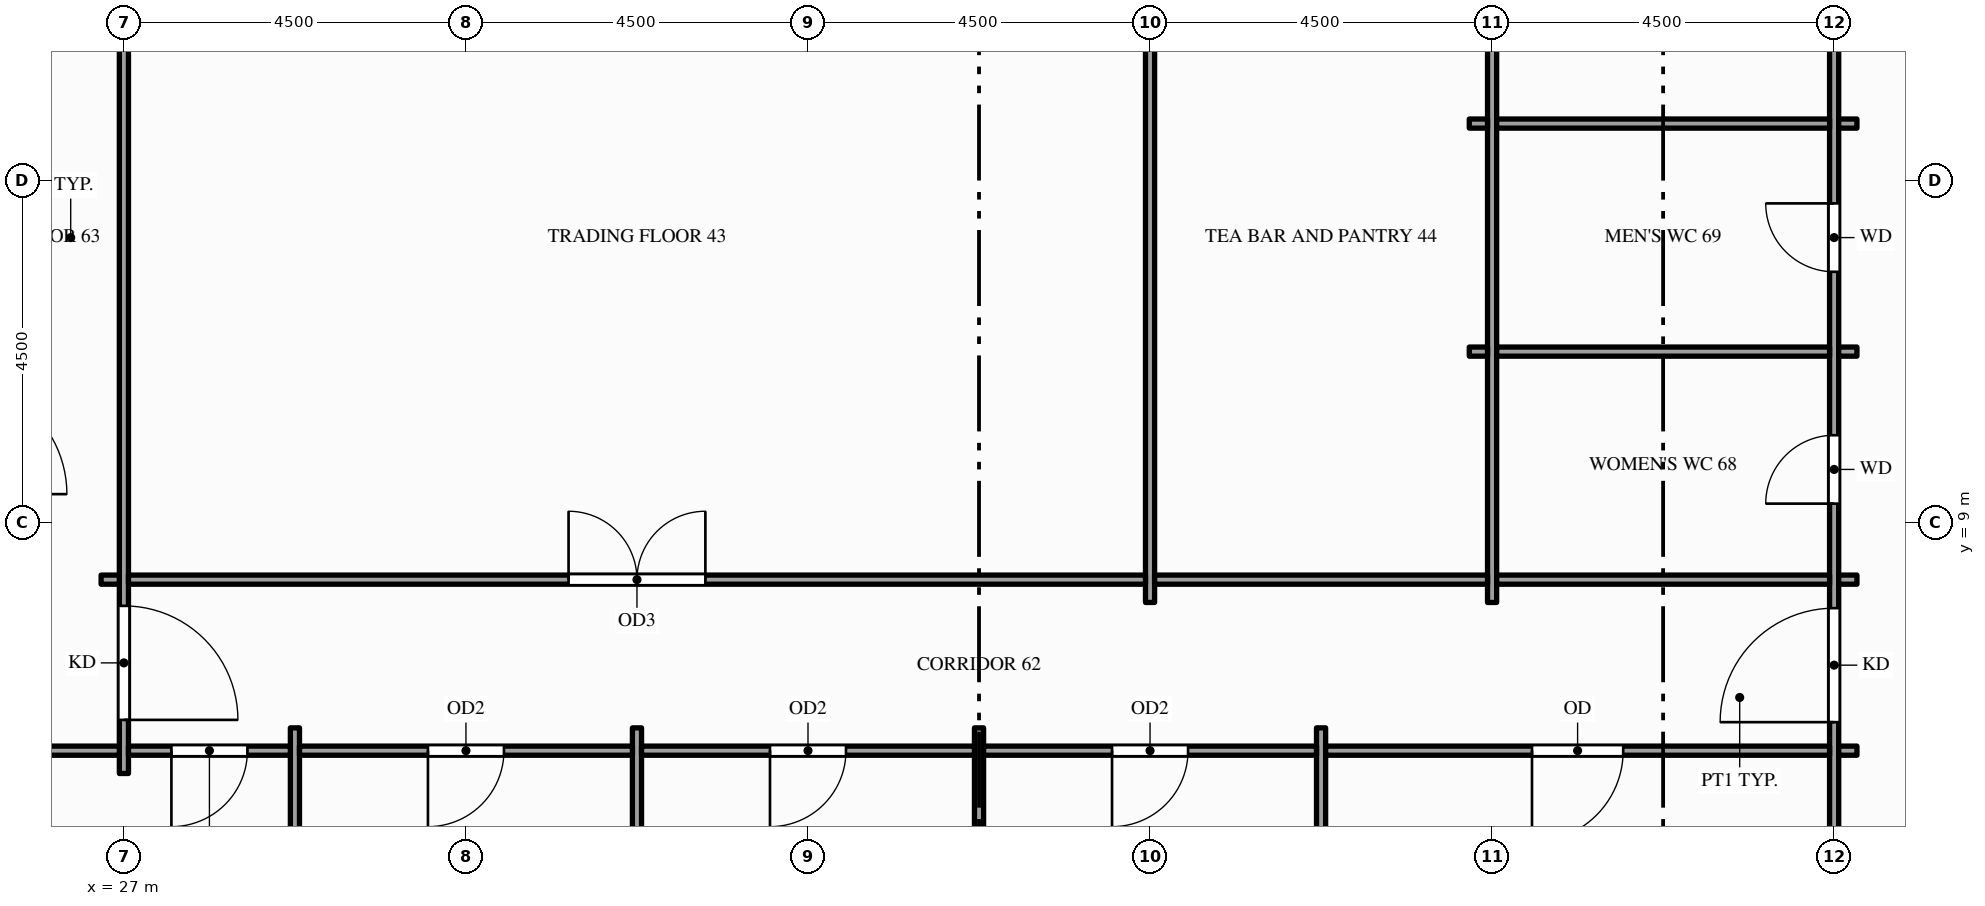
"""IFC4 building model, lengths in metres.
Left out: names, types, materials, properties, quantities, classifications, styles, units other than length and angle.
Written with IfcOpenShell. Run it as: python <this file> out.ifc"""

import sys

from ifc_helpers import new_model, si_unit, direction, frame, frame_2d, origin, place, context, subcontext, project, spatial, rectangle, extrude, element, fill, save


model = new_model("IFC4")
c1 = context("Model", 3, precision=1e-05, world=origin(), true_north=direction((0.0, 1.0)))
c2 = subcontext(c1, "Body", "Model", "MODEL_VIEW")
j1 = project(units=[si_unit("LENGTHUNIT", "METRE"), si_unit("PLANEANGLEUNIT", "RADIAN")], contexts=[c1])
p1 = place(None, origin())
s1 = spatial("IfcSite", under=j1, at=p1, CompositionType="ELEMENT")
p2 = place(p1, origin())
s2 = spatial("IfcBuilding", under=s1, at=p2, CompositionType="ELEMENT")
p3 = place(p2, frame((0.0, 0.0, 159.0)))
s3 = spatial("IfcBuildingStorey", under=s2, at=p3, CompositionType="ELEMENT", Elevation=159.0)
p4 = place(p3, frame((27.0, 5.7, 0.0), z_axis=(0.0, 0.0, 1.0), x_axis=(0.0, 1.0, 0.0)))
e1 = element("IfcWall", 1, at=p4, inside=s3, PredefinedType="PARTITIONING", context=c2, shape_type="SweptSolid", body=[
    extrude(rectangle(XDim=14.1, YDim=0.12, at=frame_2d((7.05, 0.0))), origin(), (0.0, 0.0, 1.0), 2.87),
])
p5 = place(p4, frame((0.705, 0.0, 0.0)))
e2 = element("IfcOpeningElement", 2, at=p5, cuts=e1, PredefinedType="OPENING", context=c2, shape_type="SweptSolid", body=[
    extrude(rectangle(XDim=1.5, YDim=2.1, at=frame_2d((0.75, 1.05))), frame((0.0, 0.07, 0.0), z_axis=(0.0, -1.0, 0.0), x_axis=(1.0, 0.0, 0.0)), (0.0, 0.0, 1.0), 0.14),
])
p6 = place(p4, frame((11.895, 0.0, 0.0)))
e3 = element("IfcOpeningElement", 3, at=p6, cuts=e1, PredefinedType="OPENING", context=c2, shape_type="SweptSolid", body=[
    extrude(rectangle(XDim=1.5, YDim=2.1, at=frame_2d((0.75, 1.05))), frame((0.0, 0.07, 0.0), z_axis=(0.0, -1.0, 0.0), x_axis=(1.0, 0.0, 0.0)), (0.0, 0.0, 1.0), 0.14),
])
for number, where, z_axis, x_axis in (
    (4, (29.25, 1.65, 0.0), (0.0, 0.0, 1.0), (0.0, 1.0, 0.0)),
    (5, (33.75, 1.65, 0.0), (0.0, 0.0, 1.0), (0.0, 1.0, 0.0)),
    (6, (38.25, 1.65, 0.0), (0.0, 0.0, 1.0), (0.0, 1.0, 0.0)),
):
    element("IfcWall", number, at=place(p3, frame(where, z_axis=z_axis, x_axis=x_axis)), inside=s3, PredefinedType="PARTITIONING", context=c2, shape_type="SweptSolid", body=[
        extrude(rectangle(XDim=4.65, YDim=0.12, at=frame_2d((2.325, 0.0))), origin(), (0.0, 0.0, 1.0), 2.87),
    ])
p7 = place(p3, frame((40.5, 7.95, 0.0), z_axis=(0.0, 0.0, 1.0), x_axis=(0.0, 1.0, 0.0)))
e7 = element("IfcWall", 7, at=p7, inside=s3, PredefinedType="PARTITIONING", context=c2, shape_type="SweptSolid", body=[
    extrude(rectangle(XDim=9.6, YDim=0.12, at=frame_2d((4.8, 0.0))), origin(), (0.0, 0.0, 1.0), 2.87),
])
p8 = place(p3, frame((42.75, 1.65, 0.0), z_axis=(0.0, 0.0, 1.0), x_axis=(0.0, 1.0, 0.0)))
e8 = element("IfcWall", 8, at=p8, inside=s3, PredefinedType="PARTITIONING", context=c2, shape_type="SweptSolid", body=[
    extrude(rectangle(XDim=4.65, YDim=0.12, at=frame_2d((2.325, 0.0))), origin(), (0.0, 0.0, 1.0), 2.87),
])
p9 = place(p3, frame((45.0, 7.95, 0.0), z_axis=(0.0, 0.0, 1.0), x_axis=(0.0, 1.0, 0.0)))
e9 = element("IfcWall", 9, at=p9, inside=s3, PredefinedType="PARTITIONING", context=c2, shape_type="SweptSolid", body=[
    extrude(rectangle(XDim=9.6, YDim=0.12, at=frame_2d((4.8, 0.0))), origin(), (0.0, 0.0, 1.0), 2.87),
])
p10 = place(p3, frame((49.5, 1.65, 0.0), z_axis=(0.0, 0.0, 1.0), x_axis=(0.0, 1.0, 0.0)))
e10 = element("IfcWall", 10, at=p10, inside=s3, PredefinedType="PARTITIONING", context=c2, shape_type="SweptSolid", body=[
    extrude(rectangle(XDim=22.2, YDim=0.12, at=frame_2d((11.1, 0.0))), origin(), (0.0, 0.0, 1.0), 2.87),
])
p11 = place(p10, frame((4.725, 0.0, 0.0)))
e11 = element("IfcOpeningElement", 11, at=p11, cuts=e10, PredefinedType="OPENING", context=c2, shape_type="SweptSolid", body=[
    extrude(rectangle(XDim=1.5, YDim=2.1, at=frame_2d((0.75, 1.05))), frame((0.0, 0.07, 0.0), z_axis=(0.0, -1.0, 0.0), x_axis=(1.0, 0.0, 0.0)), (0.0, 0.0, 1.0), 0.14),
])
p12 = place(p10, frame((15.975, 0.0, 0.0)))
e12 = element("IfcOpeningElement", 12, at=p12, cuts=e10, PredefinedType="OPENING", context=c2, shape_type="SweptSolid", body=[
    extrude(rectangle(XDim=1.5, YDim=2.1, at=frame_2d((0.75, 1.05))), frame((0.0, 0.07, 0.0), z_axis=(0.0, -1.0, 0.0), x_axis=(1.0, 0.0, 0.0)), (0.0, 0.0, 1.0), 0.14),
])
p13 = place(p10, frame((7.6, 0.0, 0.0)))
e13 = element("IfcOpeningElement", 13, at=p13, cuts=e10, PredefinedType="OPENING", context=c2, shape_type="SweptSolid", body=[
    extrude(rectangle(XDim=0.9, YDim=2.1, at=frame_2d((0.45, 1.05))), frame((0.0, 0.07, 0.0), z_axis=(0.0, -1.0, 0.0), x_axis=(1.0, 0.0, 0.0)), (0.0, 0.0, 1.0), 0.14),
])
p14 = place(p10, frame((10.65, 0.0, 0.0)))
e14 = element("IfcOpeningElement", 14, at=p14, cuts=e10, PredefinedType="OPENING", context=c2, shape_type="SweptSolid", body=[
    extrude(rectangle(XDim=0.9, YDim=2.1, at=frame_2d((0.45, 1.05))), frame((0.0, 0.07, 0.0), z_axis=(0.0, -1.0, 0.0), x_axis=(1.0, 0.0, 0.0)), (0.0, 0.0, 1.0), 0.14),
])
p15 = place(p10, frame((13.6, 0.0, 0.0)))
e15 = element("IfcOpeningElement", 15, at=p15, cuts=e10, PredefinedType="OPENING", context=c2, shape_type="SweptSolid", body=[
    extrude(rectangle(XDim=1.0, YDim=2.1, at=frame_2d((0.5, 1.05))), frame((0.0, 0.07, 0.0), z_axis=(0.0, -1.0, 0.0), x_axis=(1.0, 0.0, 0.0)), (0.0, 0.0, 1.0), 0.14),
])
p16 = place(p3, frame((24.81, 6.0, 0.0), z_axis=(0.0, 0.0, 1.0), x_axis=(1.0, 0.0, 0.0)))
e16 = element("IfcWall", 16, at=p16, inside=s3, PredefinedType="PARTITIONING", context=c2, shape_type="SweptSolid", body=[
    extrude(rectangle(XDim=2.13, YDim=0.12, at=frame_2d((1.065, 0.0))), origin(), (0.0, 0.0, 1.0), 2.87),
])
p17 = place(p3, frame((27.06, 6.0, 0.0), z_axis=(0.0, 0.0, 1.0), x_axis=(1.0, 0.0, 0.0)))
e17 = element("IfcWall", 17, at=p17, inside=s3, PredefinedType="PARTITIONING", context=c2, shape_type="SweptSolid", body=[
    extrude(rectangle(XDim=2.13, YDim=0.12, at=frame_2d((1.065, 0.0))), origin(), (0.0, 0.0, 1.0), 2.87),
])
p18 = place(p17, frame((0.565, 0.0, 0.0)))
e18 = element("IfcOpeningElement", 18, at=p18, cuts=e17, PredefinedType="OPENING", context=c2, shape_type="SweptSolid", body=[
    extrude(rectangle(XDim=1.0, YDim=2.1, at=frame_2d((0.5, 1.05))), frame((0.0, 0.07, 0.0), z_axis=(0.0, -1.0, 0.0), x_axis=(1.0, 0.0, 0.0)), (0.0, 0.0, 1.0), 0.14),
])
p19 = place(p3, frame((29.31, 6.0, 0.0), z_axis=(0.0, 0.0, 1.0), x_axis=(1.0, 0.0, 0.0)))
e19 = element("IfcWall", 19, at=p19, inside=s3, PredefinedType="PARTITIONING", context=c2, shape_type="SweptSolid", body=[
    extrude(rectangle(XDim=4.38, YDim=0.12, at=frame_2d((2.19, 0.0))), origin(), (0.0, 0.0, 1.0), 2.87),
])
p20 = place(p19, frame((1.69, 0.0, 0.0)))
e20 = element("IfcOpeningElement", 20, at=p20, cuts=e19, PredefinedType="OPENING", context=c2, shape_type="SweptSolid", body=[
    extrude(rectangle(XDim=1.0, YDim=2.1, at=frame_2d((0.5, 1.05))), frame((0.0, 0.07, 0.0), z_axis=(0.0, -1.0, 0.0), x_axis=(1.0, 0.0, 0.0)), (0.0, 0.0, 1.0), 0.14),
])
p21 = place(p3, frame((33.81, 6.0, 0.0), z_axis=(0.0, 0.0, 1.0), x_axis=(1.0, 0.0, 0.0)))
e21 = element("IfcWall", 21, at=p21, inside=s3, PredefinedType="PARTITIONING", context=c2, shape_type="SweptSolid", body=[
    extrude(rectangle(XDim=4.38, YDim=0.12, at=frame_2d((2.19, 0.0))), origin(), (0.0, 0.0, 1.0), 2.87),
])
p22 = place(p21, frame((1.69, 0.0, 0.0)))
e22 = element("IfcOpeningElement", 22, at=p22, cuts=e21, PredefinedType="OPENING", context=c2, shape_type="SweptSolid", body=[
    extrude(rectangle(XDim=1.0, YDim=2.1, at=frame_2d((0.5, 1.05))), frame((0.0, 0.07, 0.0), z_axis=(0.0, -1.0, 0.0), x_axis=(1.0, 0.0, 0.0)), (0.0, 0.0, 1.0), 0.14),
])
p23 = place(p3, frame((38.31, 6.0, 0.0), z_axis=(0.0, 0.0, 1.0), x_axis=(1.0, 0.0, 0.0)))
e23 = element("IfcWall", 23, at=p23, inside=s3, PredefinedType="PARTITIONING", context=c2, shape_type="SweptSolid", body=[
    extrude(rectangle(XDim=4.38, YDim=0.12, at=frame_2d((2.19, 0.0))), origin(), (0.0, 0.0, 1.0), 2.87),
])
p24 = place(p23, frame((1.69, 0.0, 0.0)))
e24 = element("IfcOpeningElement", 24, at=p24, cuts=e23, PredefinedType="OPENING", context=c2, shape_type="SweptSolid", body=[
    extrude(rectangle(XDim=1.0, YDim=2.1, at=frame_2d((0.5, 1.05))), frame((0.0, 0.07, 0.0), z_axis=(0.0, -1.0, 0.0), x_axis=(1.0, 0.0, 0.0)), (0.0, 0.0, 1.0), 0.14),
])
p25 = place(p3, frame((42.81, 6.0, 0.0), z_axis=(0.0, 0.0, 1.0), x_axis=(1.0, 0.0, 0.0)))
e25 = element("IfcWall", 25, at=p25, inside=s3, PredefinedType="PARTITIONING", context=c2, shape_type="SweptSolid", body=[
    extrude(rectangle(XDim=6.63, YDim=0.12, at=frame_2d((3.315, 0.0))), origin(), (0.0, 0.0, 1.0), 2.87),
])
p26 = place(p25, frame((2.715, 0.0, 0.0)))
e26 = element("IfcOpeningElement", 26, at=p26, cuts=e25, PredefinedType="OPENING", context=c2, shape_type="SweptSolid", body=[
    extrude(rectangle(XDim=1.2, YDim=2.1, at=frame_2d((0.6, 1.05))), frame((0.0, 0.07, 0.0), z_axis=(0.0, -1.0, 0.0), x_axis=(1.0, 0.0, 0.0)), (0.0, 0.0, 1.0), 0.14),
])
for number, where, z_axis, x_axis in (
    (27, (49.56, 6.0, 0.0), (0.0, 0.0, 1.0), (1.0, 0.0, 0.0)),
    (28, (26.7, 8.25, 0.0), (0.0, 0.0, 1.0), (1.0, 0.0, 0.0)),
):
    element("IfcWall", number, at=place(p3, frame(where, z_axis=z_axis, x_axis=x_axis)), inside=s3, PredefinedType="PARTITIONING", context=c2, shape_type="SweptSolid", body=[
        extrude(rectangle(XDim=0.24, YDim=0.12, at=frame_2d((0.12, 0.0))), origin(), (0.0, 0.0, 1.0), 2.87),
    ])
p27 = place(p3, frame((27.06, 8.25, 0.0), z_axis=(0.0, 0.0, 1.0), x_axis=(1.0, 0.0, 0.0)))
e29 = element("IfcWall", 29, at=p27, inside=s3, PredefinedType="PARTITIONING", context=c2, shape_type="SweptSolid", body=[
    extrude(rectangle(XDim=13.38, YDim=0.12, at=frame_2d((6.69, 0.0))), origin(), (0.0, 0.0, 1.0), 2.87),
])
p28 = place(p27, frame((5.79, 0.0, 0.0)))
e30 = element("IfcOpeningElement", 30, at=p28, cuts=e29, PredefinedType="OPENING", context=c2, shape_type="SweptSolid", body=[
    extrude(rectangle(XDim=1.8, YDim=2.1, at=frame_2d((0.9, 1.05))), frame((0.0, 0.07, 0.0), z_axis=(0.0, -1.0, 0.0), x_axis=(1.0, 0.0, 0.0)), (0.0, 0.0, 1.0), 0.14),
])
for number, where, z_axis, x_axis in (
    (31, (40.56, 8.25, 0.0), (0.0, 0.0, 1.0), (1.0, 0.0, 0.0)),
    (32, (45.06, 8.25, 0.0), (0.0, 0.0, 1.0), (1.0, 0.0, 0.0)),
):
    element("IfcWall", number, at=place(p3, frame(where, z_axis=z_axis, x_axis=x_axis)), inside=s3, PredefinedType="PARTITIONING", context=c2, shape_type="SweptSolid", body=[
        extrude(rectangle(XDim=4.38, YDim=0.12, at=frame_2d((2.19, 0.0))), origin(), (0.0, 0.0, 1.0), 2.87),
    ])
for number, where, z_axis, x_axis in (
    (33, (49.56, 8.25, 0.0), (0.0, 0.0, 1.0), (1.0, 0.0, 0.0)),
    (34, (44.7, 11.25, 0.0), (0.0, 0.0, 1.0), (1.0, 0.0, 0.0)),
):
    element("IfcWall", number, at=place(p3, frame(where, z_axis=z_axis, x_axis=x_axis)), inside=s3, PredefinedType="PARTITIONING", context=c2, shape_type="SweptSolid", body=[
        extrude(rectangle(XDim=0.24, YDim=0.12, at=frame_2d((0.12, 0.0))), origin(), (0.0, 0.0, 1.0), 2.87),
    ])
p29 = place(p3, frame((45.06, 11.25, 0.0), z_axis=(0.0, 0.0, 1.0), x_axis=(1.0, 0.0, 0.0)))
e35 = element("IfcWall", 35, at=p29, inside=s3, PredefinedType="PARTITIONING", context=c2, shape_type="SweptSolid", body=[
    extrude(rectangle(XDim=4.38, YDim=0.12, at=frame_2d((2.19, 0.0))), origin(), (0.0, 0.0, 1.0), 2.87),
])
for number, where, z_axis, x_axis in (
    (36, (49.56, 11.25, 0.0), (0.0, 0.0, 1.0), (1.0, 0.0, 0.0)),
    (37, (44.7, 14.25, 0.0), (0.0, 0.0, 1.0), (1.0, 0.0, 0.0)),
):
    element("IfcWall", number, at=place(p3, frame(where, z_axis=z_axis, x_axis=x_axis)), inside=s3, PredefinedType="PARTITIONING", context=c2, shape_type="SweptSolid", body=[
        extrude(rectangle(XDim=0.24, YDim=0.12, at=frame_2d((0.12, 0.0))), origin(), (0.0, 0.0, 1.0), 2.87),
    ])
p30 = place(p3, frame((45.06, 14.25, 0.0), z_axis=(0.0, 0.0, 1.0), x_axis=(1.0, 0.0, 0.0)))
e38 = element("IfcWall", 38, at=p30, inside=s3, PredefinedType="PARTITIONING", context=c2, shape_type="SweptSolid", body=[
    extrude(rectangle(XDim=4.38, YDim=0.12, at=frame_2d((2.19, 0.0))), origin(), (0.0, 0.0, 1.0), 2.87),
])
p31 = place(p3, frame((49.56, 14.25, 0.0), z_axis=(0.0, 0.0, 1.0), x_axis=(1.0, 0.0, 0.0)))
e39 = element("IfcWall", 39, at=p31, inside=s3, PredefinedType="PARTITIONING", context=c2, shape_type="SweptSolid", body=[
    extrude(rectangle(XDim=0.24, YDim=0.12, at=frame_2d((0.12, 0.0))), origin(), (0.0, 0.0, 1.0), 2.87),
])
p32 = place(p5, origin())
e40 = element("IfcDoor", 40, at=p32, inside=s3, OperationType="SINGLE_SWING_LEFT", PredefinedType="DOOR", context=c2, shape_type="SweptSolid", body=[
    extrude(rectangle(XDim=1.5, YDim=2.1, at=frame_2d((0.75, 1.05))), frame((0.0, 0.025, 0.0), z_axis=(0.0, -1.0, 0.0), x_axis=(1.0, 0.0, 0.0)), (0.0, 0.0, 1.0), 0.05),
])
fill(e2, e40)
p33 = place(p11, origin())
e41 = element("IfcDoor", 41, at=p33, inside=s3, OperationType="SINGLE_SWING_LEFT", PredefinedType="DOOR", context=c2, shape_type="SweptSolid", body=[
    extrude(rectangle(XDim=1.5, YDim=2.1, at=frame_2d((0.75, 1.05))), frame((0.0, 0.025, 0.0), z_axis=(0.0, -1.0, 0.0), x_axis=(1.0, 0.0, 0.0)), (0.0, 0.0, 1.0), 0.05),
])
fill(e11, e41)
p34 = place(p28, origin())
e42 = element("IfcDoor", 42, at=p34, inside=s3, OperationType="DOUBLE_DOOR_SINGLE_SWING", PredefinedType="DOOR", context=c2, shape_type="SweptSolid", body=[
    extrude(rectangle(XDim=1.8, YDim=2.1, at=frame_2d((0.9, 1.05))), frame((0.0, 0.025, 0.0), z_axis=(0.0, -1.0, 0.0), x_axis=(1.0, 0.0, 0.0)), (0.0, 0.0, 1.0), 0.05),
])
fill(e30, e42)
p35 = place(p13, origin())
e43 = element("IfcDoor", 43, at=p35, inside=s3, OperationType="SINGLE_SWING_LEFT", PredefinedType="DOOR", context=c2, shape_type="SweptSolid", body=[
    extrude(rectangle(XDim=0.9, YDim=2.1, at=frame_2d((0.45, 1.05))), frame((0.0, 0.025, 0.0), z_axis=(0.0, -1.0, 0.0), x_axis=(1.0, 0.0, 0.0)), (0.0, 0.0, 1.0), 0.05),
])
fill(e13, e43)
p36 = place(p14, origin())
e44 = element("IfcDoor", 44, at=p36, inside=s3, OperationType="SINGLE_SWING_RIGHT", PredefinedType="DOOR", context=c2, shape_type="SweptSolid", body=[
    extrude(rectangle(XDim=0.9, YDim=2.1, at=frame_2d((0.45, 1.05))), frame((0.0, 0.025, 0.0), z_axis=(0.0, -1.0, 0.0), x_axis=(1.0, 0.0, 0.0)), (0.0, 0.0, 1.0), 0.05),
])
fill(e14, e44)
p37 = place(p18, origin())
e45 = element("IfcDoor", 45, at=p37, inside=s3, OperationType="SINGLE_SWING_LEFT", PredefinedType="DOOR", context=c2, shape_type="SweptSolid", body=[
    extrude(rectangle(XDim=1.0, YDim=2.1, at=frame_2d((0.5, 1.05))), frame((0.0, 0.025, 0.0), z_axis=(0.0, -1.0, 0.0), x_axis=(1.0, 0.0, 0.0)), (0.0, 0.0, 1.0), 0.05),
])
fill(e18, e45)
p38 = place(p20, origin())
e46 = element("IfcDoor", 46, at=p38, inside=s3, OperationType="SINGLE_SWING_LEFT", PredefinedType="DOOR", context=c2, shape_type="SweptSolid", body=[
    extrude(rectangle(XDim=1.0, YDim=2.1, at=frame_2d((0.5, 1.05))), frame((0.0, 0.025, 0.0), z_axis=(0.0, -1.0, 0.0), x_axis=(1.0, 0.0, 0.0)), (0.0, 0.0, 1.0), 0.05),
])
fill(e20, e46)
p39 = place(p22, origin())
e47 = element("IfcDoor", 47, at=p39, inside=s3, OperationType="SINGLE_SWING_LEFT", PredefinedType="DOOR", context=c2, shape_type="SweptSolid", body=[
    extrude(rectangle(XDim=1.0, YDim=2.1, at=frame_2d((0.5, 1.05))), frame((0.0, 0.025, 0.0), z_axis=(0.0, -1.0, 0.0), x_axis=(1.0, 0.0, 0.0)), (0.0, 0.0, 1.0), 0.05),
])
fill(e22, e47)
p40 = place(p24, origin())
e48 = element("IfcDoor", 48, at=p40, inside=s3, OperationType="SINGLE_SWING_LEFT", PredefinedType="DOOR", context=c2, shape_type="SweptSolid", body=[
    extrude(rectangle(XDim=1.0, YDim=2.1, at=frame_2d((0.5, 1.05))), frame((0.0, 0.025, 0.0), z_axis=(0.0, -1.0, 0.0), x_axis=(1.0, 0.0, 0.0)), (0.0, 0.0, 1.0), 0.05),
])
fill(e24, e48)
p41 = place(p26, origin())
e49 = element("IfcDoor", 49, at=p41, inside=s3, OperationType="SINGLE_SWING_LEFT", PredefinedType="DOOR", context=c2, shape_type="SweptSolid", body=[
    extrude(rectangle(XDim=1.2, YDim=2.1, at=frame_2d((0.6, 1.05))), frame((0.0, 0.025, 0.0), z_axis=(0.0, -1.0, 0.0), x_axis=(1.0, 0.0, 0.0)), (0.0, 0.0, 1.0), 0.05),
])
fill(e26, e49)
save(model, sys.argv[1])
